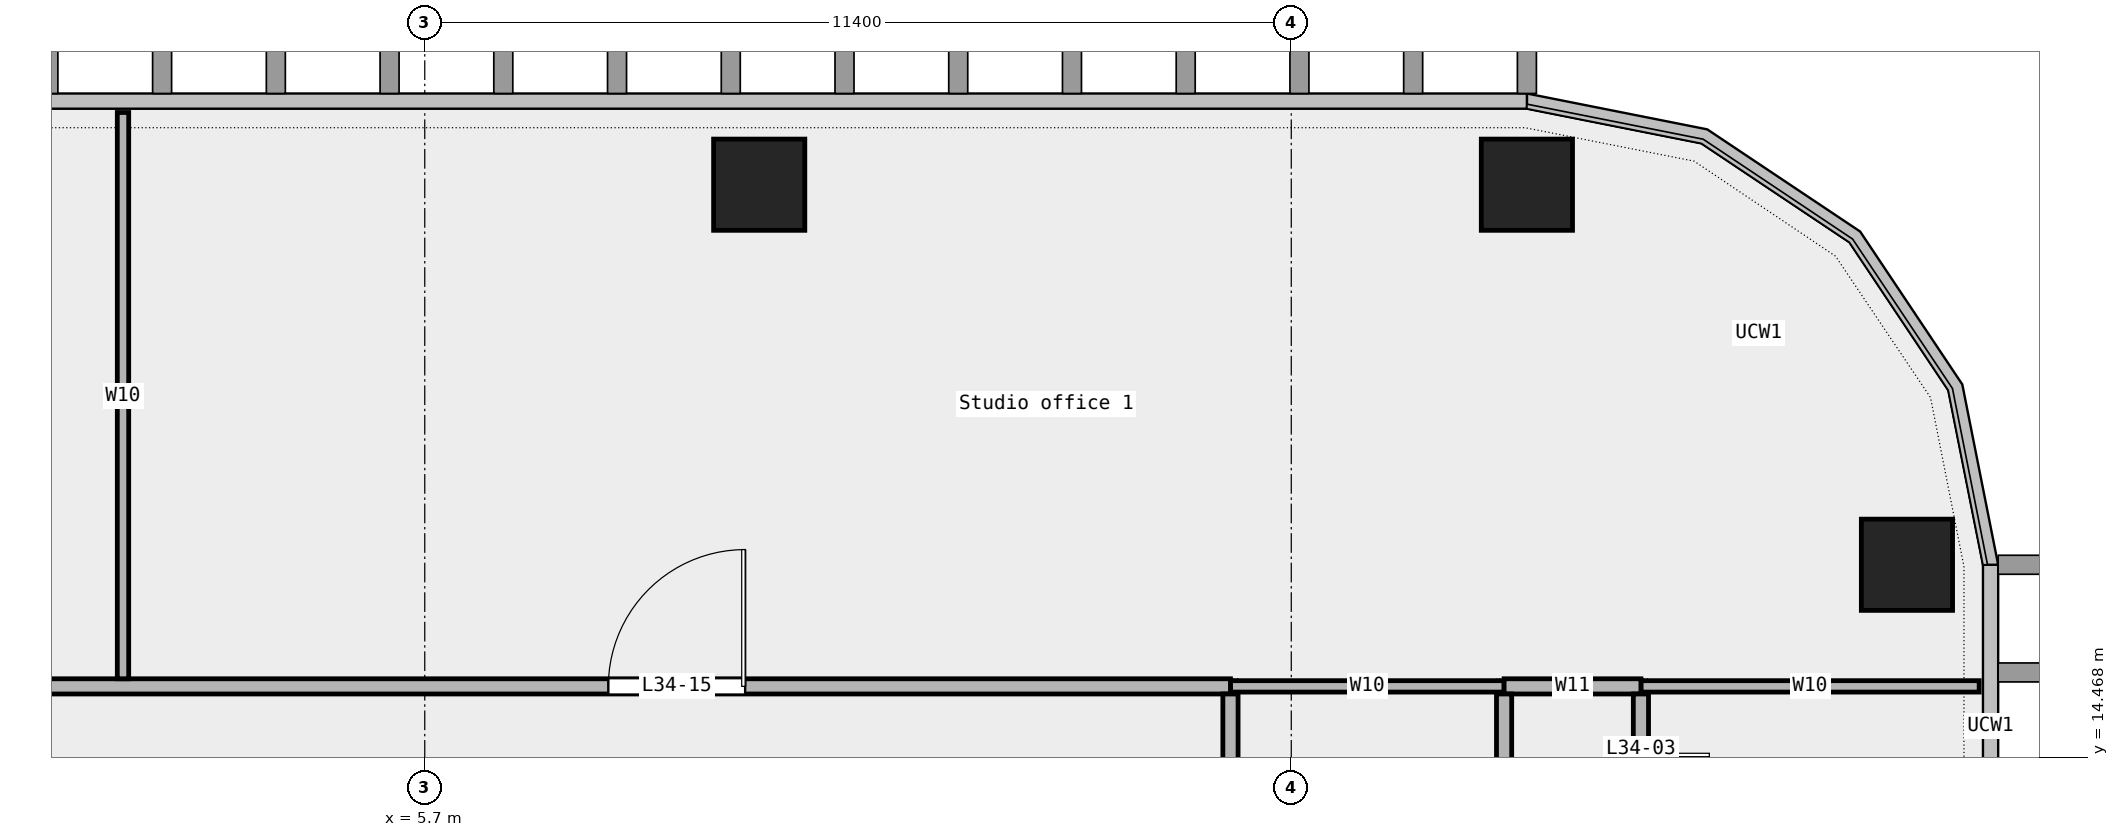
"""IFC4 building model, lengths in metres.
Left out: names, types, materials, properties, quantities, classifications, styles, units other than length and angle.
Written with IfcOpenShell. Run it as: python <this file> out.ifc"""

import sys

from ifc_helpers import new_model, si_unit, direction, frame, frame_2d, origin, origin_2d, place, context, subcontext, project, spatial, rectangle, extrude, element, fill, save


model = new_model("IFC4")
c1 = context("Model", 3, precision=1e-05, world=origin(), true_north=direction((0.0, 1.0)))
c2 = subcontext(c1, "Body", "Model", "MODEL_VIEW")
j1 = project(units=[si_unit("LENGTHUNIT", "METRE"), si_unit("PLANEANGLEUNIT", "RADIAN")], contexts=[c1])
p1 = place(None, origin())
s1 = spatial("IfcSite", under=j1, at=p1, CompositionType="ELEMENT")
p2 = place(p1, origin())
s2 = spatial("IfcBuilding", under=s1, at=p2, CompositionType="ELEMENT")
p3 = place(p2, frame((0.0, 0.0, 169.0)))
s3 = spatial("IfcBuildingStorey", under=s2, at=p3, CompositionType="ELEMENT", Elevation=169.0)
for number, where, z_axis, x_axis in (
    (1, (25.2, 17.0, 0.0), (0.0, 0.0, 1.0), (1.0, 0.0, 0.0)),
    (2, (20.2, 22.0, 0.0), (0.0, 0.0, 1.0), (1.0, 0.0, 0.0)),
    (3, (10.1, 22.0, 0.0), (0.0, 0.0, 1.0), (1.0, 0.0, 0.0)),
):
    element("IfcColumn", number, at=place(p3, frame(where, z_axis=z_axis, x_axis=x_axis)), inside=s3, PredefinedType="COLUMN", context=c2, shape_type="SweptSolid", body=[
        extrude(rectangle(XDim=1.2, YDim=1.2, at=origin_2d()), origin(), (0.0, 0.0, 1.0), 3.6),
    ])
p4 = place(p3, frame((16.3, 15.4, 0.0), z_axis=(0.0, 0.0, 1.0), x_axis=(1.0, 0.0, 0.0)))
e4 = element("IfcWall", 4, at=p4, inside=s3, PredefinedType="PARTITIONING", context=c2, shape_type="SweptSolid", body=[
    extrude(rectangle(XDim=3.6, YDim=0.15, at=frame_2d((1.8, 0.0))), origin(), (0.0, 0.0, 1.0), 3.6),
])
p5 = place(p3, frame((21.7, 15.4, 0.0), z_axis=(0.0, 0.0, 1.0), x_axis=(1.0, 0.0, 0.0)))
e5 = element("IfcWall", 5, at=p5, inside=s3, PredefinedType="PARTITIONING", context=c2, shape_type="SweptSolid", body=[
    extrude(rectangle(XDim=4.45, YDim=0.15, at=frame_2d((2.225, 0.0))), origin(), (0.0, 0.0, 1.0), 3.6),
])
p6 = place(p3, frame((-16.3, 15.4, 0.0), z_axis=(0.0, 0.0, 1.0), x_axis=(1.0, 0.0, 0.0)))
e6 = element("IfcWall", 6, at=p6, inside=s3, PredefinedType="PARTITIONING", context=c2, shape_type="SweptSolid", body=[
    extrude(rectangle(XDim=32.6, YDim=0.2, at=frame_2d((16.3, 0.0))), origin(), (0.0, 0.0, 1.0), 3.6),
])
p7 = place(p6, frame((24.415, 0.0, 0.0)))
e7 = element("IfcOpeningElement", 7, at=p7, cuts=e6, PredefinedType="OPENING", context=c2, shape_type="SweptSolid", body=[
    extrude(rectangle(XDim=1.8, YDim=2.1, at=frame_2d((0.9, 1.05))), frame((0.0, 0.112, 0.0), z_axis=(0.0, -1.0, 0.0), x_axis=(1.0, 0.0, 0.0)), (0.0, 0.0, 1.0), 0.224),
])
p8 = place(p6, frame((12.24, 0.0, 0.0)))
e8 = element("IfcOpeningElement", 8, at=p8, cuts=e6, PredefinedType="OPENING", context=c2, shape_type="SweptSolid", body=[
    extrude(rectangle(XDim=1.2, YDim=2.1, at=frame_2d((0.6, 1.05))), frame((0.0, 0.112, 0.0), z_axis=(0.0, -1.0, 0.0), x_axis=(1.0, 0.0, 0.0)), (0.0, 0.0, 1.0), 0.224),
])
p9 = place(p6, frame((3.075, 0.0, 0.0)))
e9 = element("IfcOpeningElement", 9, at=p9, cuts=e6, PredefinedType="OPENING", context=c2, shape_type="SweptSolid", body=[
    extrude(rectangle(XDim=1.5, YDim=2.1, at=frame_2d((0.75, 1.05))), frame((0.0, 0.112, 0.0), z_axis=(0.0, -1.0, 0.0), x_axis=(1.0, 0.0, 0.0)), (0.0, 0.0, 1.0), 0.224),
])
p10 = place(p3, frame((19.9, 15.4, 0.0), z_axis=(0.0, 0.0, 1.0), x_axis=(1.0, 0.0, 0.0)))
e10 = element("IfcWall", 10, at=p10, inside=s3, PredefinedType="PARTITIONING", context=c2, shape_type="SweptSolid", body=[
    extrude(rectangle(XDim=1.8, YDim=0.2, at=frame_2d((0.9, 0.0))), origin(), (0.0, 0.0, 1.0), 3.6),
])
p11 = place(p3, frame((1.73, 15.5, 0.0), z_axis=(0.0, 0.0, 1.0), x_axis=(0.0, 1.0, 0.0)))
e11 = element("IfcWall", 11, at=p11, inside=s3, PredefinedType="PARTITIONING", context=c2, shape_type="SweptSolid", body=[
    extrude(rectangle(XDim=7.45, YDim=0.15, at=frame_2d((3.725, 0.0))), origin(), (0.0, 0.0, 1.0), 3.6),
])
p12 = place(p3, frame((16.3, 11.7, 0.0), z_axis=(0.0, 0.0, 1.0), x_axis=(0.0, 1.0, 0.0)))
e12 = element("IfcWall", 12, at=p12, inside=s3, PredefinedType="PARTITIONING", context=c2, shape_type="SweptSolid", body=[
    extrude(rectangle(XDim=3.6, YDim=0.2, at=frame_2d((1.8, 0.0))), origin(), (0.0, 0.0, 1.0), 3.6),
])
p13 = place(p3, frame((19.9, -0.75, 0.0), z_axis=(0.0, 0.0, 1.0), x_axis=(0.0, 1.0, 0.0)))
e13 = element("IfcWall", 13, at=p13, inside=s3, PredefinedType="PARTITIONING", context=c2, shape_type="SweptSolid", body=[
    extrude(rectangle(XDim=16.05, YDim=0.2, at=frame_2d((8.025, 0.0))), origin(), (0.0, 0.0, 1.0), 3.6),
])
p14 = place(p13, frame((2.455, 0.0, 0.0)))
e14 = element("IfcOpeningElement", 14, at=p14, cuts=e13, PredefinedType="OPENING", context=c2, shape_type="SweptSolid", body=[
    extrude(rectangle(XDim=0.9, YDim=2.1, at=frame_2d((0.45, 1.05))), frame((0.0, 0.112, 0.0), z_axis=(0.0, -1.0, 0.0), x_axis=(1.0, 0.0, 0.0)), (0.0, 0.0, 1.0), 0.224),
])
p15 = place(p13, frame((7.802, 0.0, 0.0)))
e15 = element("IfcOpeningElement", 15, at=p15, cuts=e13, PredefinedType="OPENING", context=c2, shape_type="SweptSolid", body=[
    extrude(rectangle(XDim=0.9, YDim=2.1, at=frame_2d((0.45, 1.05))), frame((0.0, 0.112, 0.0), z_axis=(0.0, -1.0, 0.0), x_axis=(1.0, 0.0, 0.0)), (0.0, 0.0, 1.0), 0.224),
])
p16 = place(p13, frame((12.923, 0.0, 0.0)))
e16 = element("IfcOpeningElement", 16, at=p16, cuts=e13, PredefinedType="OPENING", context=c2, shape_type="SweptSolid", body=[
    extrude(rectangle(XDim=0.9, YDim=2.1, at=frame_2d((0.45, 1.05))), frame((0.0, 0.112, 0.0), z_axis=(0.0, -1.0, 0.0), x_axis=(1.0, 0.0, 0.0)), (0.0, 0.0, 1.0), 0.224),
])
p17 = place(p3, frame((21.7, -9.0, 0.0), z_axis=(0.0, 0.0, 1.0), x_axis=(0.0, 1.0, 0.0)))
e17 = element("IfcWall", 17, at=p17, inside=s3, PredefinedType="PARTITIONING", context=c2, shape_type="SweptSolid", body=[
    extrude(rectangle(XDim=24.3, YDim=0.2, at=frame_2d((12.15, 0.0))), origin(), (0.0, 0.0, 1.0), 3.6),
])
p18 = place(p17, frame((3.583, 0.0, 0.0)))
e18 = element("IfcOpeningElement", 18, at=p18, cuts=e17, PredefinedType="OPENING", context=c2, shape_type="SweptSolid", body=[
    extrude(rectangle(XDim=0.9, YDim=2.1, at=frame_2d((0.45, 1.05))), frame((0.0, 0.112, 0.0), z_axis=(0.0, -1.0, 0.0), x_axis=(1.0, 0.0, 0.0)), (0.0, 0.0, 1.0), 0.224),
])
p19 = place(p17, frame((22.575, 0.0, 0.0)))
e19 = element("IfcOpeningElement", 19, at=p19, cuts=e17, PredefinedType="OPENING", context=c2, shape_type="SweptSolid", body=[
    extrude(rectangle(XDim=0.9, YDim=2.1, at=frame_2d((0.45, 1.05))), frame((0.0, 0.112, 0.0), z_axis=(0.0, -1.0, 0.0), x_axis=(1.0, 0.0, 0.0)), (0.0, 0.0, 1.0), 0.224),
])
p20 = place(p17, frame((14.925, 0.0, 0.0)))
e20 = element("IfcOpeningElement", 20, at=p20, cuts=e17, PredefinedType="OPENING", context=c2, shape_type="SweptSolid", body=[
    extrude(rectangle(XDim=0.9, YDim=2.1, at=frame_2d((0.45, 1.05))), frame((0.0, 0.112, 0.0), z_axis=(0.0, -1.0, 0.0), x_axis=(1.0, 0.0, 0.0)), (0.0, 0.0, 1.0), 0.224),
])
p21 = place(p7, origin())
e21 = element("IfcDoor", 21, at=p21, inside=s3, OperationType="DOUBLE_DOOR_SINGLE_SWING", PredefinedType="DOOR", context=c2, shape_type="SweptSolid", body=[
    extrude(rectangle(XDim=1.8, YDim=2.1, at=frame_2d((0.9, 1.05))), frame((0.0, 0.025, 0.0), z_axis=(0.0, -1.0, 0.0), x_axis=(1.0, 0.0, 0.0)), (0.0, 0.0, 1.0), 0.05),
])
fill(e7, e21)
save(model, sys.argv[1])
